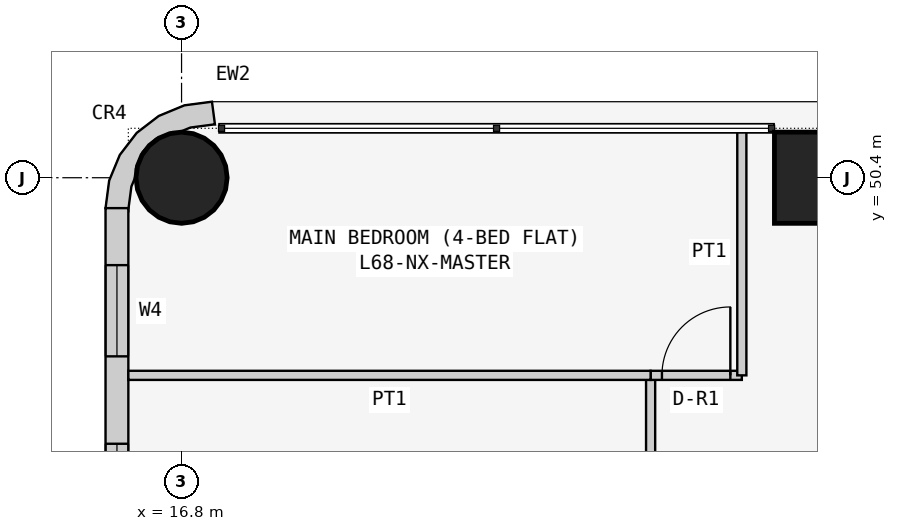
"""IFC4 building model, lengths in metres.
Left out: names, types, materials, properties, quantities, classifications, styles, units other than length and angle.
Written with IfcOpenShell. Run it as: python <this file> out.ifc"""

import sys

from ifc_helpers import new_model, si_unit, direction, frame, frame_2d, origin, origin_2d, place, context, subcontext, project, spatial, polyline, rectangle, circle, outline, extrude, element, fill, save


model = new_model("IFC4")
c1 = context("Model", 3, precision=1e-05, world=origin(), true_north=direction((0.0, 1.0)))
c2 = subcontext(c1, "Body", "Model", "MODEL_VIEW")
j1 = project(units=[si_unit("LENGTHUNIT", "METRE"), si_unit("PLANEANGLEUNIT", "RADIAN")], contexts=[c1])
p1 = place(None, origin())
s1 = spatial("IfcSite", under=j1, at=p1, CompositionType="ELEMENT")
p2 = place(p1, origin())
s2 = spatial("IfcBuilding", under=s1, at=p2, CompositionType="ELEMENT")
p3 = place(p2, frame((0.0, 0.0, 261.3)))
s3 = spatial("IfcBuildingStorey", under=s2, at=p3, CompositionType="ELEMENT", Elevation=261.3)
p4 = place(p3, frame((16.8, 50.4, 0.0), z_axis=(0.0, 0.0, 1.0), x_axis=(1.0, 0.0, 0.0)))
e1 = element("IfcColumn", 1, at=p4, inside=s3, PredefinedType="COLUMN", context=c2, shape_type="SweptSolid", body=[
    extrude(circle(Radius=0.6, at=origin_2d()), origin(), (0.0, 0.0, 1.0), 3.6),
])
p5 = place(p3, frame((25.2, 50.4, 0.0), z_axis=(0.0, 0.0, 1.0), x_axis=(1.0, 0.0, 0.0)))
e2 = element("IfcColumn", 2, at=p5, inside=s3, PredefinedType="COLUMN", context=c2, shape_type="SweptSolid", body=[
    extrude(rectangle(XDim=1.2, YDim=1.2, at=origin_2d()), origin(), (0.0, 0.0, 1.0), 3.6),
])
p6 = place(p3, frame((15.95, 50.0, 0.0), z_axis=(0.0, 0.0, 1.0), x_axis=(0.0, -1.0, 0.0)))
e3 = element("IfcWall", 3, at=p6, inside=s3, PredefinedType="SOLIDWALL", context=c2, shape_type="SweptSolid", body=[
    extrude(rectangle(XDim=7.3, YDim=0.3, at=frame_2d((3.65, 0.0))), origin(), (0.0, 0.0, 1.0), 3.45),
])
p7 = place(p6, frame((3.1, 0.0, 0.9)))
e4 = element("IfcOpeningElement", 4, at=p7, cuts=e3, PredefinedType="OPENING", context=c2, shape_type="SweptSolid", body=[
    extrude(rectangle(XDim=2.4, YDim=1.5, at=frame_2d((1.2, 0.75))), frame((0.0, 0.16, 0.0), z_axis=(0.0, -1.0, 0.0), x_axis=(1.0, 0.0, 0.0)), (0.0, 0.0, 1.0), 0.32),
])
p8 = place(p6, frame((0.75, 0.0, 0.9)))
e5 = element("IfcOpeningElement", 5, at=p8, cuts=e3, PredefinedType="OPENING", context=c2, shape_type="SweptSolid", body=[
    extrude(rectangle(XDim=1.2, YDim=1.5, at=frame_2d((0.6, 0.75))), frame((0.0, 0.16, 0.0), z_axis=(0.0, -1.0, 0.0), x_axis=(1.0, 0.0, 0.0)), (0.0, 0.0, 1.0), 0.32),
])
p9 = place(p3, frame((17.162, 50.976, 0.0), z_axis=(0.0, 0.0, 1.0), x_axis=(-0.707106781187, 0.707106781187, 0.0)))
e6 = element("IfcWall", 6, at=p9, inside=s3, PredefinedType="SOLIDWALL", context=c2, shape_type="SweptSolid", body=[
    extrude(outline(polyline([(0.047, -0.129), (0.033, -0.143), (0.273, -0.327), (0.495, -0.037), (0.635, 0.301), (0.683, 0.663), (0.635, 1.025), (0.495, 1.363), (0.273, 1.653), (0.033, 1.469), (0.047, 1.455), (0.233, 1.212), (0.292, 1.069), (0.358, 1.003), (0.449, 0.782), (0.449, 0.543), (0.358, 0.322), (0.292, 0.257), (0.233, 0.114), (0.047, -0.129)])), origin(), (0.0, 0.0, 1.0), 3.45),
])
p10 = place(p3, frame((22.971, 42.725, 0.0), z_axis=(0.0, 0.0, 1.0), x_axis=(0.0, 1.0, 0.0)))
e7 = element("IfcWall", 7, at=p10, inside=s3, PredefinedType="PARTITIONING", context=c2, shape_type="SweptSolid", body=[
    extrude(rectangle(XDim=5.075, YDim=0.12, at=frame_2d((2.538, 0.0))), origin(), (0.0, 0.0, 1.0), 3.45),
])
p11 = place(p10, frame((2.225, 0.0, 0.0)))
e8 = element("IfcOpeningElement", 8, at=p11, cuts=e7, PredefinedType="OPENING", context=c2, shape_type="SweptSolid", body=[
    extrude(rectangle(XDim=0.9, YDim=2.1, at=frame_2d((0.45, 1.05))), frame((0.0, 0.07, 0.0), z_axis=(0.0, -1.0, 0.0), x_axis=(1.0, 0.0, 0.0)), (0.0, 0.0, 1.0), 0.14),
])
p12 = place(p3, frame((22.971, 47.8, 0.0), z_axis=(0.0, 0.0, 1.0), x_axis=(1.0, 0.0, 0.0)))
e9 = element("IfcWall", 9, at=p12, inside=s3, PredefinedType="PARTITIONING", context=c2, shape_type="SweptSolid", body=[
    extrude(rectangle(XDim=1.2, YDim=0.12, at=frame_2d((0.6, 0.0))), origin(), (0.0, 0.0, 1.0), 3.45),
])
p13 = place(p12, frame((0.149, 0.0, 0.0)))
e10 = element("IfcOpeningElement", 10, at=p13, cuts=e9, PredefinedType="OPENING", context=c2, shape_type="SweptSolid", body=[
    extrude(rectangle(XDim=0.9, YDim=2.1, at=frame_2d((0.45, 1.05))), frame((0.0, 0.07, 0.0), z_axis=(0.0, -1.0, 0.0), x_axis=(1.0, 0.0, 0.0)), (0.0, 0.0, 1.0), 0.14),
])
p14 = place(p3, frame((24.171, 47.8, 0.0), z_axis=(0.0, 0.0, 1.0), x_axis=(0.0, 1.0, 0.0)))
e11 = element("IfcWall", 11, at=p14, inside=s3, PredefinedType="PARTITIONING", context=c2, shape_type="SweptSolid", body=[
    extrude(rectangle(XDim=3.25, YDim=0.12, at=frame_2d((1.625, 0.0))), origin(), (0.0, 0.0, 1.0), 3.45),
])
p15 = place(p3, frame((22.971, 47.8, 0.0), z_axis=(0.0, 0.0, 1.0), x_axis=(-1.0, 0.0, 0.0)))
e12 = element("IfcWall", 12, at=p15, inside=s3, PredefinedType="PARTITIONING", context=c2, shape_type="SweptSolid", body=[
    extrude(rectangle(XDim=6.871, YDim=0.12, at=frame_2d((3.436, 0.0))), origin(), (0.0, 0.0, 1.0), 3.45),
])
p16 = place(p7, origin())
e13 = element("IfcWindow", 13, at=p16, inside=s3, PartitioningType="SINGLE_PANEL", PredefinedType="WINDOW", context=c2, shape_type="SweptSolid", body=[
    extrude(rectangle(XDim=2.4, YDim=1.5, at=frame_2d((1.2, 0.75))), frame((0.0, 0.03, 0.0), z_axis=(0.0, -1.0, 0.0), x_axis=(1.0, 0.0, 0.0)), (0.0, 0.0, 1.0), 0.06),
])
fill(e4, e13)
p17 = place(p8, origin())
e14 = element("IfcWindow", 14, at=p17, inside=s3, PartitioningType="SINGLE_PANEL", PredefinedType="WINDOW", context=c2, shape_type="SweptSolid", body=[
    extrude(rectangle(XDim=1.2, YDim=1.5, at=frame_2d((0.6, 0.75))), frame((0.0, 0.03, 0.0), z_axis=(0.0, -1.0, 0.0), x_axis=(1.0, 0.0, 0.0)), (0.0, 0.0, 1.0), 0.06),
])
fill(e5, e14)
p18 = place(p13, origin())
e15 = element("IfcDoor", 15, at=p18, inside=s3, OperationType="SINGLE_SWING_RIGHT", PredefinedType="DOOR", context=c2, shape_type="SweptSolid", body=[
    extrude(rectangle(XDim=0.9, YDim=2.1, at=frame_2d((0.45, 1.05))), frame((0.0, 0.025, 0.0), z_axis=(0.0, -1.0, 0.0), x_axis=(1.0, 0.0, 0.0)), (0.0, 0.0, 1.0), 0.05),
])
fill(e10, e15)
save(model, sys.argv[1])
